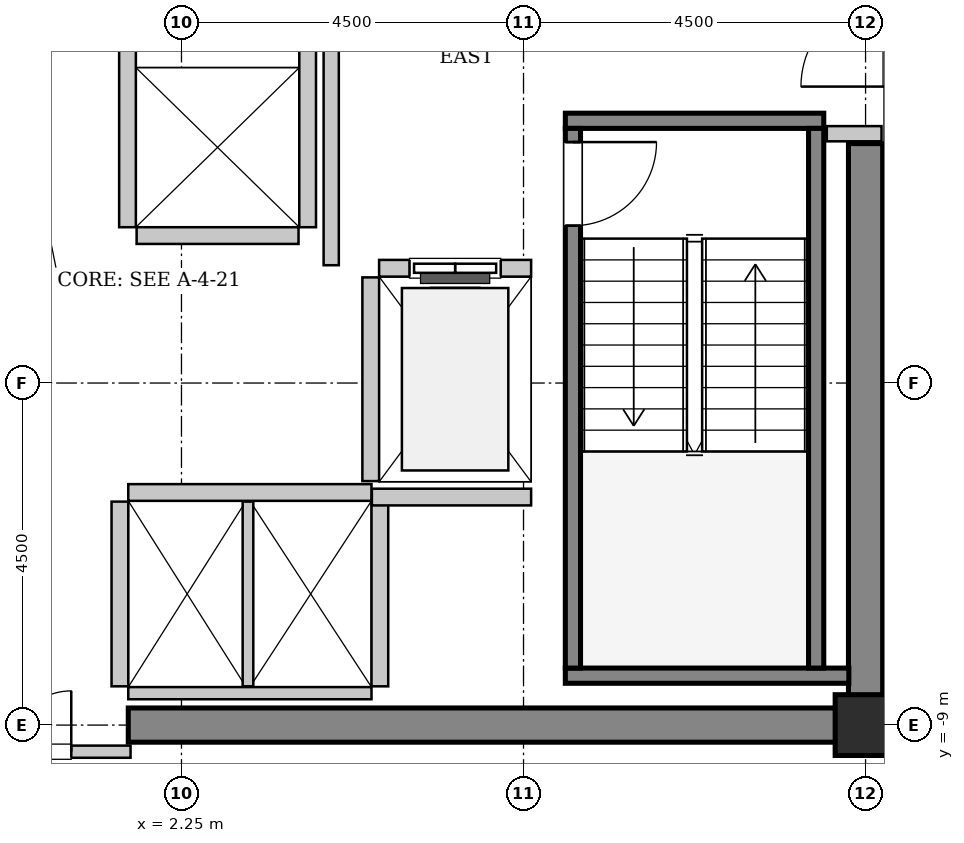
"""IFC4 building model, lengths in metres.
Left out: names, types, materials, properties, quantities, classifications, styles, units other than length and angle.
Written with IfcOpenShell. Run it as: python <this file> out.ifc"""

import sys

from ifc_helpers import new_model, si_unit, direction, frame, frame_2d, origin, origin_2d, place, context, subcontext, project, spatial, rectangle, hollow_rectangle, extrude, source, transform, mapped, element, fill, save


model = new_model("IFC4")
c1 = context("Model", 3, precision=1e-05, world=origin(), true_north=direction((0.0, 1.0)))
c2 = subcontext(c1, "Body", "Model", "MODEL_VIEW")
j1 = project(units=[si_unit("LENGTHUNIT", "METRE"), si_unit("PLANEANGLEUNIT", "RADIAN")], contexts=[c1])
p1 = place(None, origin())
s1 = spatial("IfcSite", under=j1, at=p1, CompositionType="ELEMENT")
p2 = place(p1, origin())
s2 = spatial("IfcBuilding", under=s1, at=p2, CompositionType="ELEMENT")
p3 = place(p2, frame((0.0, 0.0, 264.6)))
s3 = spatial("IfcBuildingStorey", under=s2, at=p3, CompositionType="ELEMENT", Elevation=264.6)
m1 = source(origin(), c2, "Body", "SweptSolid", [
    extrude(rectangle(XDim=9.925, YDim=0.45, at=frame_2d((4.962, 0.0))), origin(), (0.0, 0.0, 1.0), 3.8),
])
p4 = place(p3, frame((1.55, -9.0, 0.0), z_axis=(0.0, 0.0, 1.0), x_axis=(1.0, 0.0, 0.0)))
e1 = element("IfcWall", 1, at=p4, inside=s3, PredefinedType="SHEAR", context=c2, shape_type="MappedRepresentation", body=[
    mapped(m1, transform((0.0, 0.0, 0.0), x_axis=(1.0, 0.0, 0.0), y_axis=(0.0, 1.0, 0.0), z_axis=(0.0, 0.0, 1.0), scale=1.0)),
])
m2 = source(origin(), c2, "Body", "SweptSolid", [
    extrude(rectangle(XDim=7.425, YDim=0.45, at=frame_2d((3.712, 0.0))), origin(), (0.0, 0.0, 1.0), 3.8),
])
p5 = place(p3, frame((11.25, -8.775, 0.0), z_axis=(0.0, 0.0, 1.0), x_axis=(0.0, 1.0, 0.0)))
e2 = element("IfcWall", 2, at=p5, inside=s3, PredefinedType="SHEAR", context=c2, shape_type="MappedRepresentation", body=[
    mapped(m2, transform((0.0, 0.0, 0.0), x_axis=(1.0, 0.0, 0.0), y_axis=(0.0, 1.0, 0.0), z_axis=(0.0, 0.0, 1.0), scale=1.0)),
])
m3 = source(origin(), c2, "Body", "SweptSolid", [
    extrude(hollow_rectangle(XDim=0.8, YDim=0.8, WallThickness=0.04, InnerFilletRadius=0.04, OuterFilletRadius=0.08, at=origin_2d()), origin(), (0.0, 0.0, 1.0), 3.8),
])
p6 = place(p3, frame((11.25, -9.0, 0.0), z_axis=(0.0, 0.0, 1.0), x_axis=(1.0, 0.0, 0.0)))
e3 = element("IfcColumn", 3, at=p6, inside=s3, PredefinedType="COLUMN", context=c2, shape_type="MappedRepresentation", body=[
    mapped(m3, transform((0.0, 0.0, 0.0), x_axis=(1.0, 0.0, 0.0), y_axis=(0.0, 1.0, 0.0), z_axis=(0.0, 0.0, 1.0), scale=1.0)),
])
m4 = source(origin(), c2, "Body", "SweptSolid", [
    extrude(rectangle(XDim=3.4, YDim=0.2, at=frame_2d((1.7, 0.0))), origin(), (0.0, 0.0, 1.0), 3.8),
])
p7 = place(p3, frame((7.3, -1.05, 0.0), z_axis=(0.0, 0.0, 1.0), x_axis=(1.0, 0.0, 0.0)))
e4 = element("IfcWall", 4, at=p7, inside=s3, PredefinedType="SOLIDWALL", context=c2, shape_type="MappedRepresentation", body=[
    mapped(m4, transform((0.0, 0.0, 0.0), x_axis=(1.0, 0.0, 0.0), y_axis=(0.0, 1.0, 0.0), z_axis=(0.0, 0.0, 1.0), scale=1.0)),
])
m5 = source(origin(), c2, "Body", "SweptSolid", [
    extrude(rectangle(XDim=3.73, YDim=0.2, at=frame_2d((1.865, 0.0))), origin(), (0.0, 0.0, 1.0), 3.8),
])
p8 = place(p3, frame((7.3, -8.35, 0.0), z_axis=(0.0, 0.0, 1.0), x_axis=(1.0, 0.0, 0.0)))
e5 = element("IfcWall", 5, at=p8, inside=s3, PredefinedType="SOLIDWALL", context=c2, shape_type="MappedRepresentation", body=[
    mapped(m5, transform((0.0, 0.0, 0.0), x_axis=(1.0, 0.0, 0.0), y_axis=(0.0, 1.0, 0.0), z_axis=(0.0, 0.0, 1.0), scale=1.0)),
])
m6 = source(origin(), c2, "Body", "SweptSolid", [
    extrude(rectangle(XDim=7.1, YDim=0.2, at=frame_2d((3.55, 0.0))), origin(), (0.0, 0.0, 1.0), 3.8),
])
p9 = place(p3, frame((7.4, -1.15, 0.0), z_axis=(0.0, 0.0, 1.0), x_axis=(0.0, -1.0, 0.0)))
e6 = element("IfcWall", 6, at=p9, inside=s3, PredefinedType="SOLIDWALL", context=c2, shape_type="MappedRepresentation", body=[
    mapped(m6, transform((0.0, 0.0, 0.0), x_axis=(1.0, 0.0, 0.0), y_axis=(0.0, 1.0, 0.0), z_axis=(0.0, 0.0, 1.0), scale=1.0)),
])
p10 = place(p9, frame((0.18, 0.0, 0.0)))
e7 = element("IfcOpeningElement", 7, at=p10, cuts=e6, PredefinedType="OPENING", context=c2, shape_type="SweptSolid", body=[
    extrude(rectangle(XDim=1.1, YDim=2.15, at=frame_2d((0.55, 1.075))), frame((0.0, 0.11, 0.0), z_axis=(0.0, -1.0, 0.0), x_axis=(1.0, 0.0, 0.0)), (0.0, 0.0, 1.0), 0.22),
])
p11 = place(p3, frame((10.6, -1.15, 0.0), z_axis=(0.0, 0.0, 1.0), x_axis=(0.0, -1.0, 0.0)))
e8 = element("IfcWall", 8, at=p11, inside=s3, PredefinedType="SOLIDWALL", context=c2, shape_type="MappedRepresentation", body=[
    mapped(m6, transform((0.0, 0.0, 0.0), x_axis=(1.0, 0.0, 0.0), y_axis=(0.0, 1.0, 0.0), z_axis=(0.0, 0.0, 1.0), scale=1.0)),
])
m7 = source(origin(), c2, "Body", "SweptSolid", [
    extrude(rectangle(XDim=2.0, YDim=0.22, at=frame_2d((1.0, 0.0))), origin(), (0.0, 0.0, 1.0), 3.535),
])
p12 = place(p3, frame((6.85, -2.99, 0.0), z_axis=(0.0, 0.0, 1.0), x_axis=(-1.0, 0.0, 0.0)))
e9 = element("IfcWall", 9, at=p12, inside=s3, PredefinedType="SOLIDWALL", context=c2, shape_type="MappedRepresentation", body=[
    mapped(m7, transform((0.0, 0.0, 0.0), x_axis=(1.0, 0.0, 0.0), y_axis=(0.0, 1.0, 0.0), z_axis=(0.0, 0.0, 1.0), scale=1.0)),
])
p13 = place(p12, frame((0.4, 0.0, 0.0)))
e10 = element("IfcOpeningElement", 10, at=p13, cuts=e9, PredefinedType="OPENING", context=c2, shape_type="SweptSolid", body=[
    extrude(rectangle(XDim=1.2, YDim=2.2, at=frame_2d((0.6, 1.1))), frame((0.0, 0.12, 0.0), z_axis=(0.0, -1.0, 0.0), x_axis=(1.0, 0.0, 0.0)), (0.0, 0.0, 1.0), 0.24),
])
m8 = source(origin(), c2, "Body", "SweptSolid", [
    extrude(rectangle(XDim=2.68, YDim=0.22, at=frame_2d((1.34, 0.0))), origin(), (0.0, 0.0, 1.0), 3.535),
])
p14 = place(p3, frame((4.74, -3.11, 0.0), z_axis=(0.0, 0.0, 1.0), x_axis=(0.0, -1.0, 0.0)))
e11 = element("IfcWall", 11, at=p14, inside=s3, PredefinedType="SOLIDWALL", context=c2, shape_type="MappedRepresentation", body=[
    mapped(m8, transform((0.0, 0.0, 0.0), x_axis=(1.0, 0.0, 0.0), y_axis=(0.0, 1.0, 0.0), z_axis=(0.0, 0.0, 1.0), scale=1.0)),
])
m9 = source(origin(), c2, "Body", "SweptSolid", [
    extrude(rectangle(XDim=3.2, YDim=0.22, at=frame_2d((1.6, 0.0))), origin(), (0.0, 0.0, 1.0), 3.535),
])
p15 = place(p3, frame((4.75, -5.94, 0.0), z_axis=(0.0, 0.0, 1.0), x_axis=(-1.0, 0.0, 0.0)))
e12 = element("IfcWall", 12, at=p15, inside=s3, PredefinedType="SOLIDWALL", context=c2, shape_type="MappedRepresentation", body=[
    mapped(m9, transform((0.0, 0.0, 0.0), x_axis=(1.0, 0.0, 0.0), y_axis=(0.0, 1.0, 0.0), z_axis=(0.0, 0.0, 1.0), scale=1.0)),
])
m10 = source(origin(), c2, "Body", "SweptSolid", [
    extrude(rectangle(XDim=3.2, YDim=0.16, at=frame_2d((1.6, 0.0))), origin(), (0.0, 0.0, 1.0), 2.625),
])
p16 = place(p3, frame((1.55, -8.58, 0.0), z_axis=(0.0, 0.0, 1.0), x_axis=(1.0, 0.0, 0.0)))
e13 = element("IfcWall", 13, at=p16, inside=s3, PredefinedType="PARTITIONING", context=c2, shape_type="MappedRepresentation", body=[
    mapped(m10, transform((0.0, 0.0, 0.0), x_axis=(1.0, 0.0, 0.0), y_axis=(0.0, 1.0, 0.0), z_axis=(0.0, 0.0, 1.0), scale=1.0)),
])
m11 = source(origin(), c2, "Body", "SweptSolid", [
    extrude(rectangle(XDim=2.43, YDim=0.22, at=frame_2d((1.215, 0.0))), origin(), (0.0, 0.0, 1.0), 3.535),
])
p17 = place(p3, frame((1.44, -6.06, 0.0), z_axis=(0.0, 0.0, 1.0), x_axis=(0.0, -1.0, 0.0)))
e14 = element("IfcWall", 14, at=p17, inside=s3, PredefinedType="SOLIDWALL", context=c2, shape_type="MappedRepresentation", body=[
    mapped(m11, transform((0.0, 0.0, 0.0), x_axis=(1.0, 0.0, 0.0), y_axis=(0.0, 1.0, 0.0), z_axis=(0.0, 0.0, 1.0), scale=1.0)),
])
m12 = source(origin(), c2, "Body", "SweptSolid", [
    extrude(rectangle(XDim=2.43, YDim=0.14, at=frame_2d((1.215, 0.0))), origin(), (0.0, 0.0, 1.0), 3.535),
])
p18 = place(p3, frame((3.125, -8.49, 0.0), z_axis=(0.0, 0.0, 1.0), x_axis=(0.0, 1.0, 0.0)))
e15 = element("IfcWall", 15, at=p18, inside=s3, PredefinedType="PARTITIONING", context=c2, shape_type="MappedRepresentation", body=[
    mapped(m12, transform((0.0, 0.0, 0.0), x_axis=(1.0, 0.0, 0.0), y_axis=(0.0, 1.0, 0.0), z_axis=(0.0, 0.0, 1.0), scale=1.0)),
])
p19 = place(p3, frame((4.86, -8.49, 0.0), z_axis=(0.0, 0.0, 1.0), x_axis=(0.0, 1.0, 0.0)))
e16 = element("IfcWall", 16, at=p19, inside=s3, PredefinedType="SOLIDWALL", context=c2, shape_type="MappedRepresentation", body=[
    mapped(m11, transform((0.0, 0.0, 0.0), x_axis=(1.0, 0.0, 0.0), y_axis=(0.0, 1.0, 0.0), z_axis=(0.0, 0.0, 1.0), scale=1.0)),
])
m13 = source(origin(), c2, "Body", "SweptSolid", [
    extrude(rectangle(XDim=4.9, YDim=0.22, at=frame_2d((2.45, 0.0))), origin(), (0.0, 0.0, 1.0), 3.535),
])
for number, where, z_axis, x_axis in (
    (17, (1.54, 2.45, 0.0), (0.0, 0.0, 1.0), (0.0, -1.0, 0.0)),
    (18, (3.91, -2.45, 0.0), (0.0, 0.0, 1.0), (0.0, 1.0, 0.0)),
):
    element("IfcWall", number, at=place(p3, frame(where, z_axis=z_axis, x_axis=x_axis)), inside=s3, PredefinedType="SOLIDWALL", context=c2, shape_type="MappedRepresentation", body=[
        mapped(m13, transform((0.0, 0.0, 0.0), x_axis=(1.0, 0.0, 0.0), y_axis=(0.0, 1.0, 0.0), z_axis=(0.0, 0.0, 1.0), scale=1.0)),
    ])
m14 = source(origin(), c2, "Body", "SweptSolid", [
    extrude(rectangle(XDim=2.13, YDim=0.22, at=frame_2d((1.065, 0.0))), origin(), (0.0, 0.0, 1.0), 3.535),
])
p20 = place(p3, frame((1.66, -2.56, 0.0), z_axis=(0.0, 0.0, 1.0), x_axis=(1.0, 0.0, 0.0)))
e19 = element("IfcWall", 19, at=p20, inside=s3, PredefinedType="SOLIDWALL", context=c2, shape_type="MappedRepresentation", body=[
    mapped(m14, transform((0.0, 0.0, 0.0), x_axis=(1.0, 0.0, 0.0), y_axis=(0.0, 1.0, 0.0), z_axis=(0.0, 0.0, 1.0), scale=1.0)),
])
m15 = source(origin(), c2, "Body", "SweptSolid", [
    extrude(rectangle(XDim=2.095, YDim=0.22, at=frame_2d((1.048, 0.0))), origin(), (0.0, 0.0, 1.0), 3.535),
])
p21 = place(p3, frame((4.755, -6.0, 0.0), z_axis=(0.0, 0.0, 1.0), x_axis=(1.0, 0.0, 0.0)))
e20 = element("IfcWall", 20, at=p21, inside=s3, PredefinedType="SOLIDWALL", context=c2, shape_type="MappedRepresentation", body=[
    mapped(m15, transform((0.0, 0.0, 0.0), x_axis=(1.0, 0.0, 0.0), y_axis=(0.0, 1.0, 0.0), z_axis=(0.0, 0.0, 1.0), scale=1.0)),
])
m16 = source(origin(), c2, "Body", "SweptSolid", [
    extrude(rectangle(XDim=5.9, YDim=0.2, at=frame_2d((2.95, 0.0))), origin(), (0.0, 0.0, 1.0), 3.535),
])
p22 = place(p3, frame((4.22, -2.95, 0.0), z_axis=(0.0, 0.0, 1.0), x_axis=(0.0, 1.0, 0.0)))
e21 = element("IfcWall", 21, at=p22, inside=s3, PredefinedType="PARTITIONING", context=c2, shape_type="MappedRepresentation", body=[
    mapped(m16, transform((0.0, 0.0, 0.0), x_axis=(1.0, 0.0, 0.0), y_axis=(0.0, 1.0, 0.0), z_axis=(0.0, 0.0, 1.0), scale=1.0)),
])
m17 = source(origin(), c2, "Body", "SweptSolid", [
    extrude(rectangle(XDim=0.72, YDim=0.2, at=frame_2d((0.36, 0.0))), origin(), (0.0, 0.0, 1.0), 3.535),
])
p23 = place(p3, frame((10.74, -1.22, 0.0), z_axis=(0.0, 0.0, 1.0), x_axis=(1.0, 0.0, 0.0)))
e22 = element("IfcWall", 22, at=p23, inside=s3, PredefinedType="PARTITIONING", context=c2, shape_type="MappedRepresentation", body=[
    mapped(m17, transform((0.0, 0.0, 0.0), x_axis=(1.0, 0.0, 0.0), y_axis=(0.0, 1.0, 0.0), z_axis=(0.0, 0.0, 1.0), scale=1.0)),
])
m18 = source(origin(), c2, "Body", "SweptSolid", [
    extrude(rectangle(XDim=3.16, YDim=0.16, at=frame_2d((1.58, 0.0))), origin(), (0.0, 0.0, 1.0), 2.625),
])
p24 = place(p3, frame((-1.58, -9.35, 0.0), z_axis=(0.0, 0.0, 1.0), x_axis=(1.0, 0.0, 0.0)))
e23 = element("IfcWall", 23, at=p24, inside=s3, PredefinedType="PARTITIONING", context=c2, shape_type="MappedRepresentation", body=[
    mapped(m18, transform((0.0, 0.0, 0.0), x_axis=(1.0, 0.0, 0.0), y_axis=(0.0, 1.0, 0.0), z_axis=(0.0, 0.0, 1.0), scale=1.0)),
])
p25 = place(p24, frame((0.78, 0.0, 0.0)))
e24 = element("IfcOpeningElement", 24, at=p25, cuts=e23, PredefinedType="OPENING", context=c2, shape_type="SweptSolid", body=[
    extrude(rectangle(XDim=1.6, YDim=2.3, at=frame_2d((0.8, 1.15))), frame((0.0, 0.09, 0.0), z_axis=(0.0, -1.0, 0.0), x_axis=(1.0, 0.0, 0.0)), (0.0, 0.0, 1.0), 0.18),
])
m19 = source(origin(), c2, "Body", "SweptSolid", [
    extrude(rectangle(XDim=1.1, YDim=2.15, at=frame_2d((0.55, 1.075))), frame((0.0, 0.025, 0.0), z_axis=(0.0, -1.0, 0.0), x_axis=(1.0, 0.0, 0.0)), (0.0, 0.0, 1.0), 0.05),
])
p26 = place(p10, origin())
e25 = element("IfcDoor", 25, at=p26, inside=s3, OperationType="SINGLE_SWING_LEFT", PredefinedType="DOOR", context=c2, shape_type="MappedRepresentation", body=[
    mapped(m19, transform((0.0, 0.0, 0.0), x_axis=(1.0, 0.0, 0.0), y_axis=(0.0, 1.0, 0.0), z_axis=(0.0, 0.0, 1.0), scale=1.0)),
])
fill(e7, e25)
m20 = source(origin(), c2, "Body", "SweptSolid", [
    extrude(rectangle(XDim=1.2, YDim=2.2, at=frame_2d((0.6, 1.1))), frame((0.0, 0.025, 0.0), z_axis=(0.0, -1.0, 0.0), x_axis=(1.0, 0.0, 0.0)), (0.0, 0.0, 1.0), 0.05),
])
p27 = place(p13, origin())
e26 = element("IfcDoor", 26, at=p27, inside=s3, OperationType="SLIDING_TO_LEFT", PredefinedType="DOOR", context=c2, shape_type="MappedRepresentation", body=[
    mapped(m20, transform((0.0, 0.0, 0.0), x_axis=(1.0, 0.0, 0.0), y_axis=(0.0, 1.0, 0.0), z_axis=(0.0, 0.0, 1.0), scale=1.0)),
])
fill(e10, e26)
m21 = source(origin(), c2, "Body", "SweptSolid", [
    extrude(rectangle(XDim=1.6, YDim=2.3, at=frame_2d((0.8, 1.15))), frame((0.0, 0.025, 0.0), z_axis=(0.0, -1.0, 0.0), x_axis=(1.0, 0.0, 0.0)), (0.0, 0.0, 1.0), 0.05),
])
p28 = place(p25, origin())
e27 = element("IfcDoor", 27, at=p28, inside=s3, OperationType="DOUBLE_DOOR_SINGLE_SWING", PredefinedType="DOOR", context=c2, shape_type="MappedRepresentation", body=[
    mapped(m21, transform((0.0, 0.0, 0.0), x_axis=(1.0, 0.0, 0.0), y_axis=(0.0, 1.0, 0.0), z_axis=(0.0, 0.0, 1.0), scale=1.0)),
])
fill(e24, e27)
save(model, sys.argv[1])
